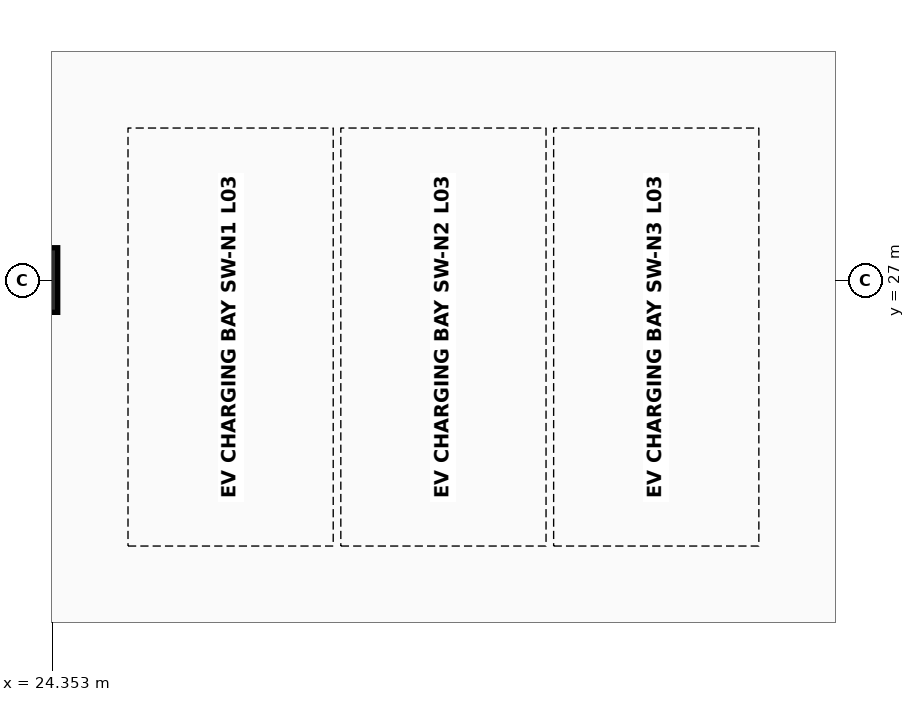
"""IFC4 building model, lengths in metres.
Left out: names, types, materials, properties, quantities, classifications, styles, units other than length and angle.
Written with IfcOpenShell. Run it as: python <this file> out.ifc"""

import sys

from ifc_helpers import new_model, si_unit, direction, frame, origin, origin_2d, place, context, subcontext, project, spatial, rectangle, extrude, element, save


model = new_model("IFC4")
c1 = context("Model", 3, precision=1e-05, world=origin(), true_north=direction((0.0, 1.0)))
c2 = subcontext(c1, "Body", "Model", "MODEL_VIEW")
j1 = project(units=[si_unit("LENGTHUNIT", "METRE"), si_unit("PLANEANGLEUNIT", "RADIAN")], contexts=[c1])
p1 = place(None, origin())
s1 = spatial("IfcSite", under=j1, at=p1, CompositionType="ELEMENT")
p2 = place(p1, origin())
s2 = spatial("IfcBuilding", under=s1, at=p2, CompositionType="ELEMENT")
p3 = place(p2, frame((0.0, 0.0, 13.4)))
s3 = spatial("IfcBuildingStorey", under=s2, at=p3, CompositionType="ELEMENT", Elevation=13.4)
p4 = place(p3, frame((24.0, 27.0, 0.0), z_axis=(0.0, 0.0, 1.0), x_axis=(1.0, 0.0, 0.0)))
e1 = element("IfcColumn", 1, at=p4, inside=s3, PredefinedType="COLUMN", context=c2, shape_type="SweptSolid", body=[
    extrude(rectangle(XDim=0.85, YDim=0.85, at=origin_2d()), origin(), (0.0, 0.0, 1.0), 3.8),
])
save(model, sys.argv[1])
